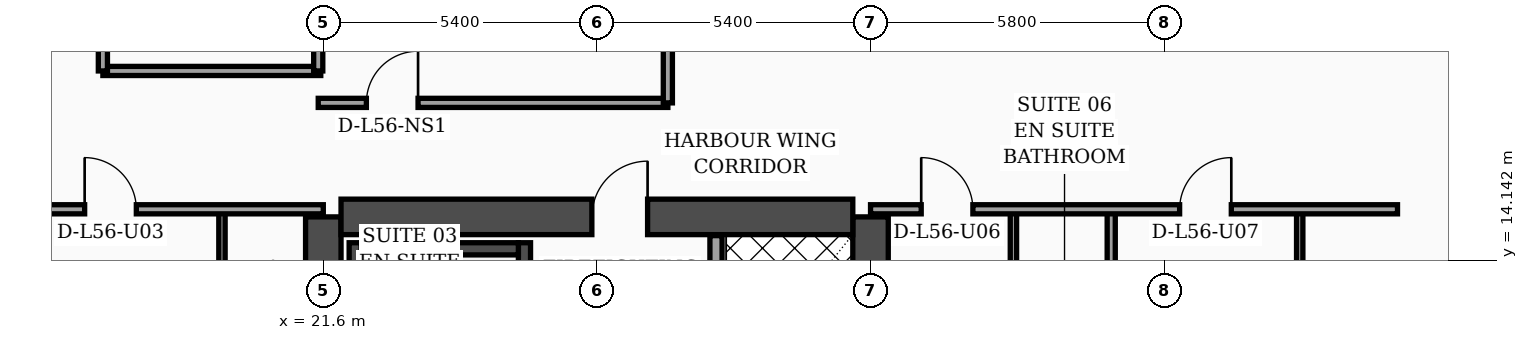
"""IFC4 building model, lengths in metres.
Left out: names, types, materials, properties, quantities, classifications, styles, units other than length and angle.
Written with IfcOpenShell. Run it as: python <this file> out.ifc"""

import sys

from ifc_helpers import new_model, si_unit, direction, frame, frame_2d, origin, place, context, subcontext, project, spatial, rectangle, extrude, element, fill, save


model = new_model("IFC4")
c1 = context("Model", 3, precision=1e-05, world=origin(), true_north=direction((0.0, 1.0)))
c2 = subcontext(c1, "Body", "Model", "MODEL_VIEW")
j1 = project(units=[si_unit("LENGTHUNIT", "METRE"), si_unit("PLANEANGLEUNIT", "RADIAN")], contexts=[c1])
p1 = place(None, origin())
s1 = spatial("IfcSite", under=j1, at=p1, CompositionType="ELEMENT")
p2 = place(p1, origin())
s2 = spatial("IfcBuilding", under=s1, at=p2, CompositionType="ELEMENT")
p3 = place(p2, frame((0.0, 0.0, 226.9)))
s3 = spatial("IfcBuildingStorey", under=s2, at=p3, CompositionType="ELEMENT", Elevation=226.9)
for number, where, z_axis, x_axis in (
    (1, (21.6, 4.6, 0.0), (0.0, 0.0, 1.0), (0.0, 1.0, 0.0)),
    (2, (32.4, 4.6, 0.0), (0.0, 0.0, 1.0), (0.0, 1.0, 0.0)),
):
    element("IfcWall", number, at=place(p3, frame(where, z_axis=z_axis, x_axis=x_axis)), inside=s3, PredefinedType="SHEAR", context=c2, shape_type="SweptSolid", body=[
        extrude(rectangle(XDim=10.4, YDim=0.7, at=frame_2d((5.2, 0.0))), origin(), (0.0, 0.0, 1.0), 3.56),
    ])
p4 = place(p3, frame((21.95, 15.0, 0.0), z_axis=(0.0, 0.0, 1.0), x_axis=(1.0, 0.0, 0.0)))
e3 = element("IfcWall", 3, at=p4, inside=s3, PredefinedType="SHEAR", context=c2, shape_type="SweptSolid", body=[
    extrude(rectangle(XDim=10.1, YDim=0.7, at=frame_2d((5.05, 0.0))), origin(), (0.0, 0.0, 1.0), 3.56),
])
p5 = place(p4, frame((4.95, 0.0, 0.0)))
e4 = element("IfcOpeningElement", 4, at=p5, cuts=e3, PredefinedType="OPENING", context=c2, shape_type="SweptSolid", body=[
    extrude(rectangle(XDim=1.1, YDim=2.2, at=frame_2d((0.55, 1.1))), frame((0.0, 0.36, 0.0), z_axis=(0.0, -1.0, 0.0), x_axis=(1.0, 0.0, 0.0)), (0.0, 0.0, 1.0), 0.72),
])
p6 = place(p3, frame((22.23, 4.95, 0.0), z_axis=(0.0, 0.0, 1.0), x_axis=(0.0, 1.0, 0.0)))
e5 = element("IfcWall", 5, at=p6, inside=s3, PredefinedType="SOLIDWALL", context=c2, shape_type="SweptSolid", body=[
    extrude(rectangle(XDim=9.54, YDim=0.24, at=frame_2d((4.77, 0.0))), origin(), (0.0, 0.0, 1.0), 3.56),
])
p7 = place(p3, frame((25.57, 4.95, 0.0), z_axis=(0.0, 0.0, 1.0), x_axis=(0.0, 1.0, 0.0)))
e6 = element("IfcWall", 6, at=p7, inside=s3, PredefinedType="SOLIDWALL", context=c2, shape_type="SweptSolid", body=[
    extrude(rectangle(XDim=9.54, YDim=0.24, at=frame_2d((4.77, 0.0))), origin(), (0.0, 0.0, 1.0), 3.56),
])
p8 = place(p7, frame((0.35, 0.0, 0.0)))
e7 = element("IfcOpeningElement", 7, at=p8, cuts=e6, PredefinedType="OPENING", context=c2, shape_type="SweptSolid", body=[
    extrude(rectangle(XDim=1.15, YDim=2.2, at=frame_2d((0.575, 1.1))), frame((0.0, 0.13, 0.0), z_axis=(0.0, -1.0, 0.0), x_axis=(1.0, 0.0, 0.0)), (0.0, 0.0, 1.0), 0.26),
])
p9 = place(p3, frame((22.35, 14.37, 0.0), z_axis=(0.0, 0.0, 1.0), x_axis=(1.0, 0.0, 0.0)))
e8 = element("IfcWall", 8, at=p9, inside=s3, PredefinedType="SOLIDWALL", context=c2, shape_type="SweptSolid", body=[
    extrude(rectangle(XDim=3.1, YDim=0.24, at=frame_2d((1.55, 0.0))), origin(), (0.0, 0.0, 1.0), 3.56),
])
p10 = place(p3, frame((49.43, 5.505, 0.0), z_axis=(0.0, 0.0, 1.0), x_axis=(-0.300509063924, 0.953778958931, 0.0)))
e9 = element("IfcWall", 9, at=p10, inside=s3, PredefinedType="SOLIDWALL", context=c2, shape_type="SweptSolid", body=[
    extrude(rectangle(XDim=30.814, YDim=0.32, at=frame_2d((15.407, 0.0))), origin(), (0.0, 0.0, 1.0), 3.56),
])
p11 = place(p10, frame((10.199, 0.0, 0.0)))
e10 = element("IfcOpeningElement", 10, at=p11, cuts=e9, PredefinedType="OPENING", context=c2, shape_type="SweptSolid", body=[
    extrude(rectangle(XDim=1.4, YDim=2.25, at=frame_2d((0.7, 1.125))), frame((0.0, 0.17, 0.0), z_axis=(0.0, -1.0, 0.0), x_axis=(1.0, 0.0, 0.0)), (0.0, 0.0, 1.0), 0.34),
])
p12 = place(p10, frame((4.437, 0.0, 0.7)))
e11 = element("IfcOpeningElement", 11, at=p12, cuts=e9, PredefinedType="OPENING", context=c2, shape_type="SweptSolid", body=[
    extrude(rectangle(XDim=1.6, YDim=1.65, at=frame_2d((0.8, 0.825))), frame((0.0, 0.17, 0.0), z_axis=(0.0, -1.0, 0.0), x_axis=(1.0, 0.0, 0.0)), (0.0, 0.0, 1.0), 0.34),
])
p13 = place(p10, frame((18.696, 0.0, 0.7)))
e12 = element("IfcOpeningElement", 12, at=p13, cuts=e9, PredefinedType="OPENING", context=c2, shape_type="SweptSolid", body=[
    extrude(rectangle(XDim=1.6, YDim=1.65, at=frame_2d((0.8, 0.825))), frame((0.0, 0.17, 0.0), z_axis=(0.0, -1.0, 0.0), x_axis=(1.0, 0.0, 0.0)), (0.0, 0.0, 1.0), 0.34),
])
p14 = place(p10, frame((1.6, 0.0, 0.75)))
e13 = element("IfcOpeningElement", 13, at=p14, cuts=e9, PredefinedType="OPENING", context=c2, shape_type="SweptSolid", body=[
    extrude(rectangle(XDim=1.5, YDim=1.6, at=frame_2d((0.75, 0.8))), frame((0.0, 0.17, 0.0), z_axis=(0.0, -1.0, 0.0), x_axis=(1.0, 0.0, 0.0)), (0.0, 0.0, 1.0), 0.34),
])
p15 = place(p10, frame((7.8, 0.0, 0.75)))
e14 = element("IfcOpeningElement", 14, at=p15, cuts=e9, PredefinedType="OPENING", context=c2, shape_type="SweptSolid", body=[
    extrude(rectangle(XDim=1.5, YDim=1.6, at=frame_2d((0.75, 0.8))), frame((0.0, 0.17, 0.0), z_axis=(0.0, -1.0, 0.0), x_axis=(1.0, 0.0, 0.0)), (0.0, 0.0, 1.0), 0.34),
])
p16 = place(p10, frame((14.0, 0.0, 0.75)))
e15 = element("IfcOpeningElement", 15, at=p16, cuts=e9, PredefinedType="OPENING", context=c2, shape_type="SweptSolid", body=[
    extrude(rectangle(XDim=1.5, YDim=1.6, at=frame_2d((0.75, 0.8))), frame((0.0, 0.17, 0.0), z_axis=(0.0, -1.0, 0.0), x_axis=(1.0, 0.0, 0.0)), (0.0, 0.0, 1.0), 0.34),
])
p17 = place(p10, frame((16.55, 0.0, 0.75)))
e16 = element("IfcOpeningElement", 16, at=p17, cuts=e9, PredefinedType="OPENING", context=c2, shape_type="SweptSolid", body=[
    extrude(rectangle(XDim=1.5, YDim=1.6, at=frame_2d((0.75, 0.8))), frame((0.0, 0.17, 0.0), z_axis=(0.0, -1.0, 0.0), x_axis=(1.0, 0.0, 0.0)), (0.0, 0.0, 1.0), 0.34),
])
p18 = place(p10, frame((20.75, 0.0, 0.75)))
e17 = element("IfcOpeningElement", 17, at=p18, cuts=e9, PredefinedType="OPENING", context=c2, shape_type="SweptSolid", body=[
    extrude(rectangle(XDim=1.5, YDim=1.6, at=frame_2d((0.75, 0.8))), frame((0.0, 0.17, 0.0), z_axis=(0.0, -1.0, 0.0), x_axis=(1.0, 0.0, 0.0)), (0.0, 0.0, 1.0), 0.34),
])
p19 = place(p10, frame((23.3, 0.0, 0.75)))
e18 = element("IfcOpeningElement", 18, at=p19, cuts=e9, PredefinedType="OPENING", context=c2, shape_type="SweptSolid", body=[
    extrude(rectangle(XDim=1.5, YDim=1.6, at=frame_2d((0.75, 0.8))), frame((0.0, 0.17, 0.0), z_axis=(0.0, -1.0, 0.0), x_axis=(1.0, 0.0, 0.0)), (0.0, 0.0, 1.0), 0.34),
])
p20 = place(p10, frame((26.4, 0.0, 0.75)))
e19 = element("IfcOpeningElement", 19, at=p20, cuts=e9, PredefinedType="OPENING", context=c2, shape_type="SweptSolid", body=[
    extrude(rectangle(XDim=1.5, YDim=1.6, at=frame_2d((0.75, 0.8))), frame((0.0, 0.17, 0.0), z_axis=(0.0, -1.0, 0.0), x_axis=(1.0, 0.0, 0.0)), (0.0, 0.0, 1.0), 0.34),
])
p21 = place(p3, frame((29.35, 4.97, 0.0), z_axis=(0.0, 0.0, 1.0), x_axis=(0.0, 1.0, 0.0)))
e20 = element("IfcWall", 20, at=p21, inside=s3, PredefinedType="SOLIDWALL", context=c2, shape_type="SweptSolid", body=[
    extrude(rectangle(XDim=9.66, YDim=0.24, at=frame_2d((4.83, 0.0))), origin(), (0.0, 0.0, 1.0), 3.56),
])
p22 = place(p21, frame((0.55, 0.0, 0.0)))
e21 = element("IfcOpeningElement", 21, at=p22, cuts=e20, PredefinedType="OPENING", context=c2, shape_type="SweptSolid", body=[
    extrude(rectangle(XDim=1.3, YDim=2.35, at=frame_2d((0.65, 1.175))), frame((0.0, 0.13, 0.0), z_axis=(0.0, -1.0, 0.0), x_axis=(1.0, 0.0, 0.0)), (0.0, 0.0, 1.0), 0.26),
])
p23 = place(p3, frame((19.6, 2.44, 0.0), z_axis=(0.0, 0.0, 1.0), x_axis=(0.0, 1.0, 0.0)))
e22 = element("IfcWall", 22, at=p23, inside=s3, PredefinedType="PARTITIONING", context=c2, shape_type="SweptSolid", body=[
    extrude(rectangle(XDim=12.71, YDim=0.125, at=frame_2d((6.355, 0.0))), origin(), (0.0, 0.0, 1.0), 2.59),
])
p24 = place(p23, frame((4.34, 0.0, 0.0)))
e23 = element("IfcOpeningElement", 23, at=p24, cuts=e22, PredefinedType="OPENING", context=c2, shape_type="SweptSolid", body=[
    extrude(rectangle(XDim=0.96, YDim=2.2, at=frame_2d((0.48, 1.1))), frame((0.0, 0.073, 0.0), z_axis=(0.0, -1.0, 0.0), x_axis=(1.0, 0.0, 0.0)), (0.0, 0.0, 1.0), 0.145),
])
p25 = place(p23, frame((10.18, 0.0, 0.0)))
e24 = element("IfcOpeningElement", 24, at=p25, cuts=e22, PredefinedType="OPENING", context=c2, shape_type="SweptSolid", body=[
    extrude(rectangle(XDim=0.9, YDim=2.15, at=frame_2d((0.45, 1.075))), frame((0.0, 0.073, 0.0), z_axis=(0.0, -1.0, 0.0), x_axis=(1.0, 0.0, 0.0)), (0.0, 0.0, 1.0), 0.145),
])
p26 = place(p3, frame((15.15, 15.15, 0.0), z_axis=(0.0, 0.0, 1.0), x_axis=(1.0, 0.0, 0.0)))
e25 = element("IfcWall", 25, at=p26, inside=s3, PredefinedType="PARTITIONING", context=c2, shape_type="SweptSolid", body=[
    extrude(rectangle(XDim=6.45, YDim=0.18, at=frame_2d((3.225, 0.0))), origin(), (0.0, 0.0, 1.0), 2.59),
])
p27 = place(p26, frame((1.74, 0.0, 0.0)))
e26 = element("IfcOpeningElement", 26, at=p27, cuts=e25, PredefinedType="OPENING", context=c2, shape_type="SweptSolid", body=[
    extrude(rectangle(XDim=1.02, YDim=2.2, at=frame_2d((0.51, 1.1))), frame((0.0, 0.1, 0.0), z_axis=(0.0, -1.0, 0.0), x_axis=(1.0, 0.0, 0.0)), (0.0, 0.0, 1.0), 0.2),
])
p28 = place(p3, frame((17.25, 17.88, 0.0), z_axis=(0.0, 0.0, 1.0), x_axis=(1.0, 0.0, 0.0)))
e27 = element("IfcWall", 27, at=p28, inside=s3, PredefinedType="PARTITIONING", context=c2, shape_type="SweptSolid", body=[
    extrude(rectangle(XDim=4.3, YDim=0.18, at=frame_2d((2.15, 0.0))), origin(), (0.0, 0.0, 1.0), 3.56),
])
p29 = place(p3, frame((21.5, 17.88, 0.0), z_axis=(0.0, 0.0, 1.0), x_axis=(0.0, 1.0, 0.0)))
e28 = element("IfcWall", 28, at=p29, inside=s3, PredefinedType="PARTITIONING", context=c2, shape_type="SweptSolid", body=[
    extrude(rectangle(XDim=6.44, YDim=0.18, at=frame_2d((3.22, 0.0))), origin(), (0.0, 0.0, 1.0), 3.09),
])
p30 = place(p3, frame((17.25, 17.88, 0.0), z_axis=(0.0, 0.0, 1.0), x_axis=(0.0, 1.0, 0.0)))
e29 = element("IfcWall", 29, at=p30, inside=s3, PredefinedType="PARTITIONING", context=c2, shape_type="SweptSolid", body=[
    extrude(rectangle(XDim=6.44, YDim=0.18, at=frame_2d((3.22, 0.0))), origin(), (0.0, 0.0, 1.0), 3.09),
])
p31 = place(p30, frame((0.65, 0.0, 0.0)))
e30 = element("IfcOpeningElement", 30, at=p31, cuts=e29, PredefinedType="OPENING", context=c2, shape_type="SweptSolid", body=[
    extrude(rectangle(XDim=0.98, YDim=2.15, at=frame_2d((0.49, 1.075))), frame((0.0, 0.1, 0.0), z_axis=(0.0, -1.0, 0.0), x_axis=(1.0, 0.0, 0.0)), (0.0, 0.0, 1.0), 0.2),
])
p32 = place(p30, frame((3.27, 0.0, 0.0)))
e31 = element("IfcOpeningElement", 31, at=p32, cuts=e29, PredefinedType="OPENING", context=c2, shape_type="SweptSolid", body=[
    extrude(rectangle(XDim=0.96, YDim=2.2, at=frame_2d((0.48, 1.1))), frame((0.0, 0.1, 0.0), z_axis=(0.0, -1.0, 0.0), x_axis=(1.0, 0.0, 0.0)), (0.0, 0.0, 1.0), 0.2),
])
p33 = place(p3, frame((35.22, 2.44, 0.0), z_axis=(0.0, 0.0, 1.0), x_axis=(0.0, 1.0, 0.0)))
e32 = element("IfcWall", 32, at=p33, inside=s3, PredefinedType="PARTITIONING", context=c2, shape_type="SweptSolid", body=[
    extrude(rectangle(XDim=12.71, YDim=0.125, at=frame_2d((6.355, 0.0))), origin(), (0.0, 0.0, 1.0), 2.94),
])
p34 = place(p33, frame((4.35, 0.0, 0.0)))
e33 = element("IfcOpeningElement", 33, at=p34, cuts=e32, PredefinedType="OPENING", context=c2, shape_type="SweptSolid", body=[
    extrude(rectangle(XDim=0.96, YDim=2.2, at=frame_2d((0.48, 1.1))), frame((0.0, 0.073, 0.0), z_axis=(0.0, -1.0, 0.0), x_axis=(1.0, 0.0, 0.0)), (0.0, 0.0, 1.0), 0.145),
])
p35 = place(p33, frame((10.21, 0.0, 0.0)))
e34 = element("IfcOpeningElement", 34, at=p35, cuts=e32, PredefinedType="OPENING", context=c2, shape_type="SweptSolid", body=[
    extrude(rectangle(XDim=0.9, YDim=2.15, at=frame_2d((0.45, 1.075))), frame((0.0, 0.073, 0.0), z_axis=(0.0, -1.0, 0.0), x_axis=(1.0, 0.0, 0.0)), (0.0, 0.0, 1.0), 0.145),
])
p36 = place(p3, frame((40.87, 2.44, 0.0), z_axis=(0.0, 0.0, 1.0), x_axis=(0.0, 1.0, 0.0)))
e35 = element("IfcWall", 35, at=p36, inside=s3, PredefinedType="PARTITIONING", context=c2, shape_type="SweptSolid", body=[
    extrude(rectangle(XDim=12.71, YDim=0.125, at=frame_2d((6.355, 0.0))), origin(), (0.0, 0.0, 1.0), 2.94),
])
p37 = place(p36, frame((4.35, 0.0, 0.0)))
e36 = element("IfcOpeningElement", 36, at=p37, cuts=e35, PredefinedType="OPENING", context=c2, shape_type="SweptSolid", body=[
    extrude(rectangle(XDim=0.96, YDim=2.2, at=frame_2d((0.48, 1.1))), frame((0.0, 0.073, 0.0), z_axis=(0.0, -1.0, 0.0), x_axis=(1.0, 0.0, 0.0)), (0.0, 0.0, 1.0), 0.145),
])
p38 = place(p36, frame((10.21, 0.0, 0.0)))
e37 = element("IfcOpeningElement", 37, at=p38, cuts=e35, PredefinedType="OPENING", context=c2, shape_type="SweptSolid", body=[
    extrude(rectangle(XDim=0.9, YDim=2.15, at=frame_2d((0.45, 1.075))), frame((0.0, 0.073, 0.0), z_axis=(0.0, -1.0, 0.0), x_axis=(1.0, 0.0, 0.0)), (0.0, 0.0, 1.0), 0.145),
])
p39 = place(p3, frame((37.15, 2.44, 0.0), z_axis=(0.0, 0.0, 1.0), x_axis=(0.0, 1.0, 0.0)))
e38 = element("IfcWall", 38, at=p39, inside=s3, PredefinedType="PARTITIONING", context=c2, shape_type="SweptSolid", body=[
    extrude(rectangle(XDim=12.71, YDim=0.16, at=frame_2d((6.355, 0.0))), origin(), (0.0, 0.0, 1.0), 2.94),
])
p40 = place(p3, frame((32.4, 15.15, 0.0), z_axis=(0.0, 0.0, 1.0), x_axis=(1.0, 0.0, 0.0)))
e39 = element("IfcWall", 39, at=p40, inside=s3, PredefinedType="PARTITIONING", context=c2, shape_type="SweptSolid", body=[
    extrude(rectangle(XDim=10.4, YDim=0.18, at=frame_2d((5.2, 0.0))), origin(), (0.0, 0.0, 1.0), 2.94),
])
p41 = place(p40, frame((1.0, 0.0, 0.0)))
e40 = element("IfcOpeningElement", 40, at=p41, cuts=e39, PredefinedType="OPENING", context=c2, shape_type="SweptSolid", body=[
    extrude(rectangle(XDim=1.02, YDim=2.2, at=frame_2d((0.51, 1.1))), frame((0.0, 0.1, 0.0), z_axis=(0.0, -1.0, 0.0), x_axis=(1.0, 0.0, 0.0)), (0.0, 0.0, 1.0), 0.2),
])
p42 = place(p40, frame((6.1, 0.0, 0.0)))
e41 = element("IfcOpeningElement", 41, at=p42, cuts=e39, PredefinedType="OPENING", context=c2, shape_type="SweptSolid", body=[
    extrude(rectangle(XDim=1.02, YDim=2.2, at=frame_2d((0.51, 1.1))), frame((0.0, 0.1, 0.0), z_axis=(0.0, -1.0, 0.0), x_axis=(1.0, 0.0, 0.0)), (0.0, 0.0, 1.0), 0.2),
])
p43 = place(p3, frame((21.5, 17.25, 0.0), z_axis=(0.0, 0.0, 1.0), x_axis=(1.0, 0.0, 0.0)))
e42 = element("IfcWall", 42, at=p43, inside=s3, PredefinedType="PARTITIONING", context=c2, shape_type="SweptSolid", body=[
    extrude(rectangle(XDim=6.9, YDim=0.18, at=frame_2d((3.45, 0.0))), origin(), (0.0, 0.0, 1.0), 2.94),
])
p44 = place(p43, frame((0.95, 0.0, 0.0)))
e43 = element("IfcOpeningElement", 43, at=p44, cuts=e42, PredefinedType="OPENING", context=c2, shape_type="SweptSolid", body=[
    extrude(rectangle(XDim=1.02, YDim=2.2, at=frame_2d((0.51, 1.1))), frame((0.0, 0.1, 0.0), z_axis=(0.0, -1.0, 0.0), x_axis=(1.0, 0.0, 0.0)), (0.0, 0.0, 1.0), 0.2),
])
p45 = place(p3, frame((28.4, 17.25, 0.0), z_axis=(0.0, 0.0, 1.0), x_axis=(0.0, 1.0, 0.0)))
e44 = element("IfcWall", 44, at=p45, inside=s3, PredefinedType="PARTITIONING", context=c2, shape_type="SweptSolid", body=[
    extrude(rectangle(XDim=13.56, YDim=0.18, at=frame_2d((6.78, 0.0))), origin(), (0.0, 0.0, 1.0), 2.94),
])
p46 = place(p27, origin())
e45 = element("IfcDoor", 45, at=p46, inside=s3, OperationType="SINGLE_SWING_LEFT", PredefinedType="DOOR", context=c2, shape_type="SweptSolid", body=[
    extrude(rectangle(XDim=1.02, YDim=2.2, at=frame_2d((0.51, 1.1))), frame((0.0, 0.025, 0.0), z_axis=(0.0, -1.0, 0.0), x_axis=(1.0, 0.0, 0.0)), (0.0, 0.0, 1.0), 0.05),
])
fill(e26, e45)
p47 = place(p41, origin())
e46 = element("IfcDoor", 46, at=p47, inside=s3, OperationType="SINGLE_SWING_LEFT", PredefinedType="DOOR", context=c2, shape_type="SweptSolid", body=[
    extrude(rectangle(XDim=1.02, YDim=2.2, at=frame_2d((0.51, 1.1))), frame((0.0, 0.025, 0.0), z_axis=(0.0, -1.0, 0.0), x_axis=(1.0, 0.0, 0.0)), (0.0, 0.0, 1.0), 0.05),
])
fill(e40, e46)
p48 = place(p42, origin())
e47 = element("IfcDoor", 47, at=p48, inside=s3, OperationType="SINGLE_SWING_RIGHT", PredefinedType="DOOR", context=c2, shape_type="SweptSolid", body=[
    extrude(rectangle(XDim=1.02, YDim=2.2, at=frame_2d((0.51, 1.1))), frame((0.0, 0.025, 0.0), z_axis=(0.0, -1.0, 0.0), x_axis=(1.0, 0.0, 0.0)), (0.0, 0.0, 1.0), 0.05),
])
fill(e41, e47)
p49 = place(p44, origin())
e48 = element("IfcDoor", 48, at=p49, inside=s3, OperationType="SINGLE_SWING_RIGHT", PredefinedType="DOOR", context=c2, shape_type="SweptSolid", body=[
    extrude(rectangle(XDim=1.02, YDim=2.2, at=frame_2d((0.51, 1.1))), frame((0.0, 0.025, 0.0), z_axis=(0.0, -1.0, 0.0), x_axis=(1.0, 0.0, 0.0)), (0.0, 0.0, 1.0), 0.05),
])
fill(e43, e48)
p50 = place(p5, origin())
e49 = element("IfcDoor", 49, at=p50, inside=s3, OperationType="SINGLE_SWING_RIGHT", PredefinedType="DOOR", context=c2, shape_type="SweptSolid", body=[
    extrude(rectangle(XDim=1.1, YDim=2.2, at=frame_2d((0.55, 1.1))), frame((0.0, 0.025, 0.0), z_axis=(0.0, -1.0, 0.0), x_axis=(1.0, 0.0, 0.0)), (0.0, 0.0, 1.0), 0.05),
])
fill(e4, e49)
save(model, sys.argv[1])
